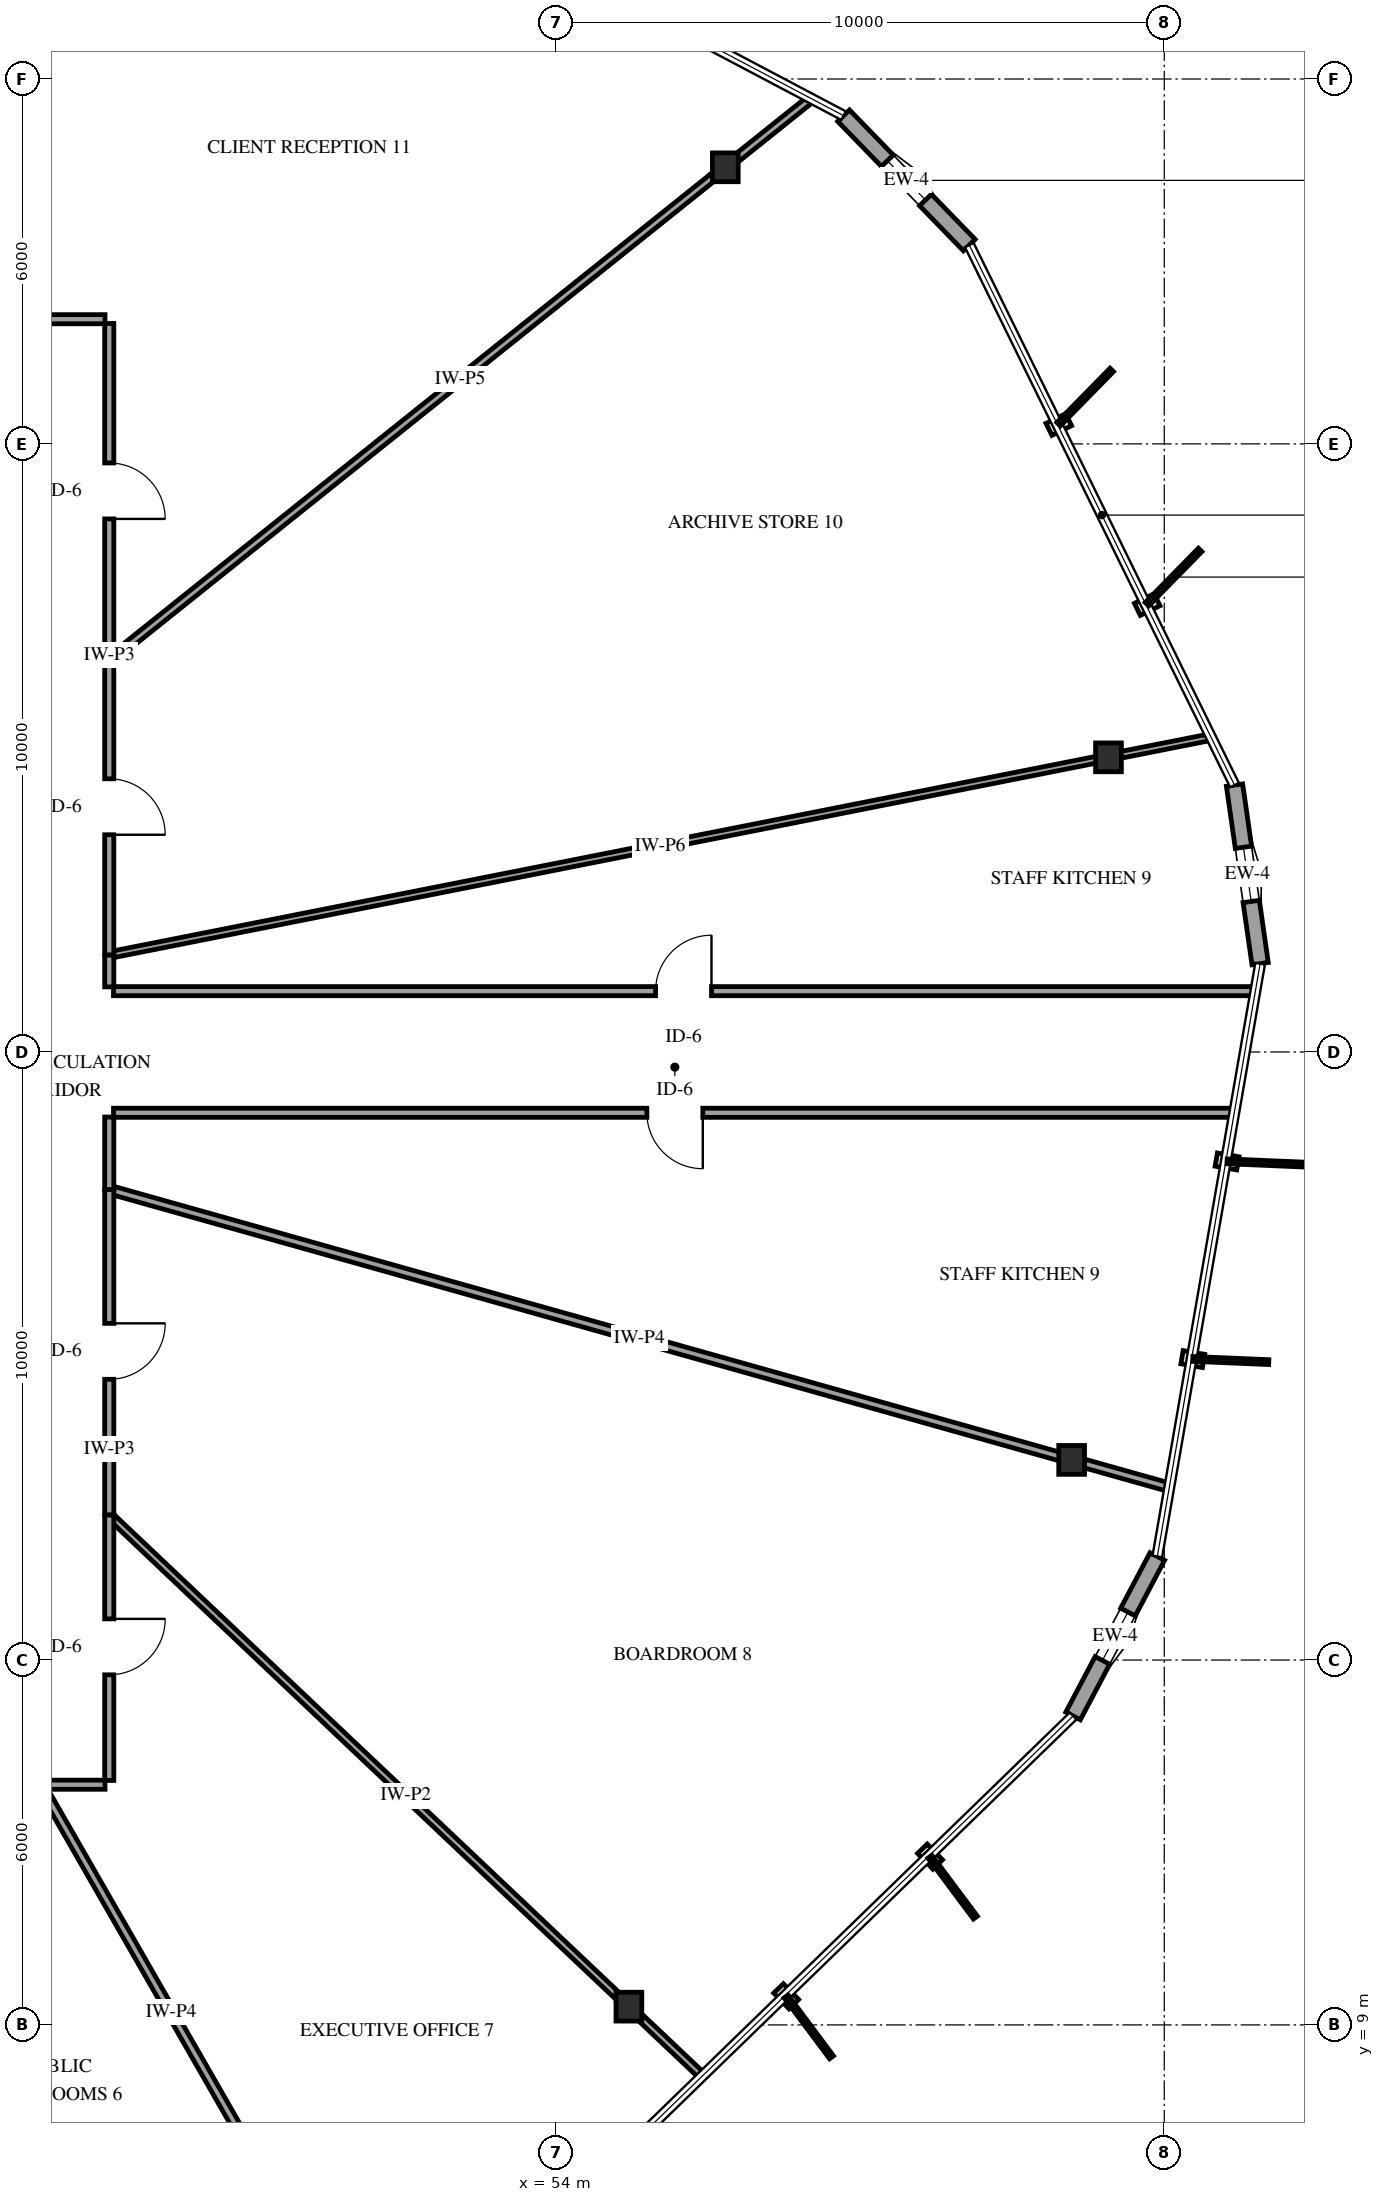
"""IFC4 building model, lengths in metres.
Left out: names, types, materials, properties, quantities, classifications, styles, units other than length and angle.
Written with IfcOpenShell. Run it as: python <this file> out.ifc"""

import sys

from ifc_helpers import new_model, si_unit, direction, frame, frame_2d, origin, origin_2d, place, context, subcontext, project, spatial, rectangle, i_section, extrude, element, fill, save


model = new_model("IFC4")
c1 = context("Model", 3, precision=1e-05, world=origin(), true_north=direction((0.0, 1.0)))
c2 = subcontext(c1, "Body", "Model", "MODEL_VIEW")
j1 = project(units=[si_unit("LENGTHUNIT", "METRE"), si_unit("PLANEANGLEUNIT", "RADIAN")], contexts=[c1])
p1 = place(None, origin())
s1 = spatial("IfcSite", under=j1, at=p1, CompositionType="ELEMENT")
p2 = place(p1, origin())
s2 = spatial("IfcBuilding", under=s1, at=p2, CompositionType="ELEMENT")
p3 = place(p2, frame((0.0, 0.0, 58.6)))
s3 = spatial("IfcBuildingStorey", under=s2, at=p3, CompositionType="ELEMENT", Elevation=58.6)
for number, where, z_axis, x_axis in (
    (1, (63.082, 29.845, 0.0), (0.0, 0.0, 1.0), (1.0, 0.0, 0.0)),
    (2, (56.781, 39.548, 0.0), (0.0, 0.0, 1.0), (1.0, 0.0, 0.0)),
    (3, (55.196, 9.3, 0.0), (0.0, 0.0, 1.0), (1.0, 0.0, 0.0)),
    (4, (62.477, 18.292, 0.0), (0.0, 0.0, 1.0), (1.0, 0.0, 0.0)),
):
    element("IfcColumn", number, at=place(p3, frame(where, z_axis=z_axis, x_axis=x_axis)), inside=s3, PredefinedType="COLUMN", context=c2, shape_type="SweptSolid", body=[
        extrude(i_section(OverallWidth=0.424, OverallDepth=0.474, WebThickness=0.048, FlangeThickness=0.077, FilletRadius=0.038, at=origin_2d()), origin(), (0.0, 0.0, 1.0), 4.0),
    ])
p4 = place(p3, frame((60.793, 38.269, 0.0), z_axis=(0.0, 0.0, 1.0), x_axis=(-0.69666106732, 0.717400416282, 0.0)))
e5 = element("IfcWall", 5, at=p4, inside=s3, PredefinedType="SOLIDWALL", context=c2, shape_type="SweptSolid", body=[
    extrude(rectangle(XDim=2.967, YDim=0.27, at=frame_2d((1.483, 0.0))), origin(), (0.0, 0.0, 1.0), 3.079),
])
p5 = place(p4, frame((1.033, 0.0, 0.75)))
e6 = element("IfcOpeningElement", 6, at=p5, cuts=e5, PredefinedType="OPENING", context=c2, shape_type="SweptSolid", body=[
    extrude(rectangle(XDim=0.9, YDim=1.5, at=frame_2d((0.45, 0.75))), frame((0.0, 0.145, 0.0), z_axis=(0.0, -1.0, 0.0), x_axis=(1.0, 0.0, 0.0)), (0.0, 0.0, 1.0), 0.29),
])
p6 = place(p3, frame((62.5, 14.08, 0.0), z_axis=(0.0, 0.0, 1.0), x_axis=(0.467017847618, 0.884247889455, 0.0)))
e7 = element("IfcWall", 7, at=p6, inside=s3, PredefinedType="SOLIDWALL", context=c2, shape_type="SweptSolid", body=[
    extrude(rectangle(XDim=2.967, YDim=0.27, at=frame_2d((1.483, 0.0))), origin(), (0.0, 0.0, 1.0), 3.079),
])
p7 = place(p6, frame((1.033, 0.0, 0.75)))
e8 = element("IfcOpeningElement", 8, at=p7, cuts=e7, PredefinedType="OPENING", context=c2, shape_type="SweptSolid", body=[
    extrude(rectangle(XDim=0.9, YDim=1.5, at=frame_2d((0.45, 0.75))), frame((0.0, 0.145, 0.0), z_axis=(0.0, -1.0, 0.0), x_axis=(1.0, 0.0, 0.0)), (0.0, 0.0, 1.0), 0.29),
])
p8 = place(p3, frame((65.576, 26.452, 0.0), z_axis=(0.0, 0.0, 1.0), x_axis=(-0.141962851347, 0.989871986086, 0.0)))
e9 = element("IfcWall", 9, at=p8, inside=s3, PredefinedType="SOLIDWALL", context=c2, shape_type="SweptSolid", body=[
    extrude(rectangle(XDim=2.967, YDim=0.27, at=frame_2d((1.483, 0.0))), origin(), (0.0, 0.0, 1.0), 3.079),
])
p9 = place(p8, frame((1.033, 0.0, 0.75)))
e10 = element("IfcOpeningElement", 10, at=p9, cuts=e9, PredefinedType="OPENING", context=c2, shape_type="SweptSolid", body=[
    extrude(rectangle(XDim=0.9, YDim=1.5, at=frame_2d((0.45, 0.75))), frame((0.0, 0.145, 0.0), z_axis=(0.0, -1.0, 0.0), x_axis=(1.0, 0.0, 0.0)), (0.0, 0.0, 1.0), 0.29),
])
p10 = place(p3, frame((46.72, 26.0, 0.0), z_axis=(0.0, 0.0, 1.0), x_axis=(1.0, 0.0, 0.0)))
e11 = element("IfcWall", 11, at=p10, inside=s3, PredefinedType="PARTITIONING", context=c2, shape_type="SweptSolid", body=[
    extrude(rectangle(XDim=18.778, YDim=0.15, at=frame_2d((9.389, 0.0))), origin(), (0.0, 0.0, 1.0), 3.7),
])
p11 = place(p10, frame((8.914, 0.0, 0.0)))
e12 = element("IfcOpeningElement", 12, at=p11, cuts=e11, PredefinedType="OPENING", context=c2, shape_type="SweptSolid", body=[
    extrude(rectangle(XDim=0.92, YDim=2.12, at=frame_2d((0.46, 1.06))), frame((0.0, 0.085, 0.0), z_axis=(0.0, -1.0, 0.0), x_axis=(1.0, 0.0, 0.0)), (0.0, 0.0, 1.0), 0.17),
])
p12 = place(p3, frame((46.65, 26.593, 0.0), z_axis=(0.0, 0.0, 1.0), x_axis=(0.980969206426, 0.194163374622, 0.0)))
e13 = element("IfcWall", 13, at=p12, inside=s3, PredefinedType="PARTITIONING", context=c2, shape_type="SweptSolid", body=[
    extrude(rectangle(XDim=18.469, YDim=0.11, at=frame_2d((9.234, 0.0))), origin(), (0.0, 0.0, 1.0), 2.995),
])
p13 = place(p3, frame((65.151, 24.0, 0.0), z_axis=(0.0, 0.0, 1.0), x_axis=(-1.0, 0.0, 0.0)))
e14 = element("IfcWall", 14, at=p13, inside=s3, PredefinedType="PARTITIONING", context=c2, shape_type="SweptSolid", body=[
    extrude(rectangle(XDim=18.431, YDim=0.15, at=frame_2d((9.215, 0.0))), origin(), (0.0, 0.0, 1.0), 3.7),
])
p14 = place(p13, frame((8.74, 0.0, 0.0)))
e15 = element("IfcOpeningElement", 15, at=p14, cuts=e14, PredefinedType="OPENING", context=c2, shape_type="SweptSolid", body=[
    extrude(rectangle(XDim=0.92, YDim=2.12, at=frame_2d((0.46, 1.06))), frame((0.0, 0.085, 0.0), z_axis=(0.0, -1.0, 0.0), x_axis=(1.0, 0.0, 0.0)), (0.0, 0.0, 1.0), 0.17),
])
p15 = place(p3, frame((46.65, 22.738, 0.0), z_axis=(0.0, 0.0, 1.0), x_axis=(0.962724478267, -0.270483971697, 0.0)))
e16 = element("IfcWall", 16, at=p15, inside=s3, PredefinedType="PARTITIONING", context=c2, shape_type="SweptSolid", body=[
    extrude(rectangle(XDim=18.108, YDim=0.14, at=frame_2d((9.054, 0.0))), origin(), (0.0, 0.0, 1.0), 2.995),
])
p16 = place(p3, frame((46.65, 31.442, 0.0), z_axis=(0.0, 0.0, 1.0), x_axis=(0.780812420754, 0.624765526895, 0.0)))
e17 = element("IfcWall", 17, at=p16, inside=s3, PredefinedType="PARTITIONING", context=c2, shape_type="SweptSolid", body=[
    extrude(rectangle(XDim=14.785, YDim=0.13, at=frame_2d((7.393, 0.0))), origin(), (0.0, 0.0, 1.0), 3.7),
])
p17 = place(p3, frame((46.65, 17.385, 0.0), z_axis=(0.0, 0.0, 1.0), x_axis=(0.726394067909, -0.687278442923, 0.0)))
e18 = element("IfcWall", 18, at=p17, inside=s3, PredefinedType="PARTITIONING", context=c2, shape_type="SweptSolid", body=[
    extrude(rectangle(XDim=13.426, YDim=0.12, at=frame_2d((6.713, 0.0))), origin(), (0.0, 0.0, 1.0), 2.995),
])
p18 = place(p3, frame((43.356, 37.05, 0.0), z_axis=(0.0, 0.0, 1.0), x_axis=(0.367253717082, 0.930120802525, 0.0)))
e19 = element("IfcWall", 19, at=p18, inside=s3, PredefinedType="PARTITIONING", context=c2, shape_type="SweptSolid", body=[
    extrude(rectangle(XDim=9.053, YDim=0.1, at=frame_2d((4.527, 0.0))), origin(), (0.0, 0.0, 1.0), 2.995),
])
p19 = place(p3, frame((45.517, 12.95, 0.0), z_axis=(0.0, 0.0, 1.0), x_axis=(0.497782071086, -0.867302144414, 0.0)))
e20 = element("IfcWall", 20, at=p19, inside=s3, PredefinedType="PARTITIONING", context=c2, shape_type="SweptSolid", body=[
    extrude(rectangle(XDim=8.636, YDim=0.14, at=frame_2d((4.318, 0.0))), origin(), (0.0, 0.0, 1.0), 3.074),
])
p20 = place(p3, frame((46.65, 36.98, 0.0), z_axis=(0.0, 0.0, 1.0), x_axis=(0.0, -1.0, 0.0)))
e21 = element("IfcWall", 21, at=p20, inside=s3, PredefinedType="PARTITIONING", context=c2, shape_type="SweptSolid", body=[
    extrude(rectangle(XDim=5.538, YDim=0.15, at=frame_2d((2.769, 0.0))), origin(), (0.0, 0.0, 1.0), 3.7),
])
p21 = place(p20, frame((2.294, 0.0, 0.0)))
e22 = element("IfcOpeningElement", 22, at=p21, cuts=e21, PredefinedType="OPENING", context=c2, shape_type="SweptSolid", body=[
    extrude(rectangle(XDim=0.92, YDim=2.12, at=frame_2d((0.46, 1.06))), frame((0.0, 0.085, 0.0), z_axis=(0.0, -1.0, 0.0), x_axis=(1.0, 0.0, 0.0)), (0.0, 0.0, 1.0), 0.17),
])
p22 = place(p3, frame((46.65, 22.738, 0.0), z_axis=(0.0, 0.0, 1.0), x_axis=(0.0, -1.0, 0.0)))
e23 = element("IfcWall", 23, at=p22, inside=s3, PredefinedType="PARTITIONING", context=c2, shape_type="SweptSolid", body=[
    extrude(rectangle(XDim=5.353, YDim=0.15, at=frame_2d((2.677, 0.0))), origin(), (0.0, 0.0, 1.0), 3.7),
])
p23 = place(p22, frame((2.201, 0.0, 0.0)))
e24 = element("IfcOpeningElement", 24, at=p23, cuts=e23, PredefinedType="OPENING", context=c2, shape_type="SweptSolid", body=[
    extrude(rectangle(XDim=0.92, YDim=2.12, at=frame_2d((0.46, 1.06))), frame((0.0, 0.085, 0.0), z_axis=(0.0, -1.0, 0.0), x_axis=(1.0, 0.0, 0.0)), (0.0, 0.0, 1.0), 0.17),
])
p24 = place(p3, frame((46.65, 31.442, 0.0), z_axis=(0.0, 0.0, 1.0), x_axis=(0.0, -1.0, 0.0)))
e25 = element("IfcWall", 25, at=p24, inside=s3, PredefinedType="PARTITIONING", context=c2, shape_type="SweptSolid", body=[
    extrude(rectangle(XDim=4.849, YDim=0.15, at=frame_2d((2.424, 0.0))), origin(), (0.0, 0.0, 1.0), 3.7),
])
p25 = place(p24, frame((1.95, 0.0, 0.0)))
e26 = element("IfcOpeningElement", 26, at=p25, cuts=e25, PredefinedType="OPENING", context=c2, shape_type="SweptSolid", body=[
    extrude(rectangle(XDim=0.92, YDim=2.12, at=frame_2d((0.46, 1.06))), frame((0.0, 0.085, 0.0), z_axis=(0.0, -1.0, 0.0), x_axis=(1.0, 0.0, 0.0)), (0.0, 0.0, 1.0), 0.17),
])
p26 = place(p3, frame((46.65, 17.385, 0.0), z_axis=(0.0, 0.0, 1.0), x_axis=(0.0, -1.0, 0.0)))
e27 = element("IfcWall", 27, at=p26, inside=s3, PredefinedType="PARTITIONING", context=c2, shape_type="SweptSolid", body=[
    extrude(rectangle(XDim=4.365, YDim=0.15, at=frame_2d((2.183, 0.0))), origin(), (0.0, 0.0, 1.0), 3.7),
])
p27 = place(p26, frame((1.708, 0.0, 0.0)))
e28 = element("IfcOpeningElement", 28, at=p27, cuts=e27, PredefinedType="OPENING", context=c2, shape_type="SweptSolid", body=[
    extrude(rectangle(XDim=0.92, YDim=2.12, at=frame_2d((0.46, 1.06))), frame((0.0, 0.085, 0.0), z_axis=(0.0, -1.0, 0.0), x_axis=(1.0, 0.0, 0.0)), (0.0, 0.0, 1.0), 0.17),
])
p28 = place(p3, frame((43.356, 37.05, 0.0), z_axis=(0.0, 0.0, 1.0), x_axis=(1.0, 0.0, 0.0)))
e29 = element("IfcWall", 29, at=p28, inside=s3, PredefinedType="PARTITIONING", context=c2, shape_type="SweptSolid", body=[
    extrude(rectangle(XDim=3.224, YDim=0.15, at=frame_2d((1.612, 0.0))), origin(), (0.0, 0.0, 1.0), 3.7),
])
p29 = place(p3, frame((46.65, 23.93, 0.0), z_axis=(0.0, 0.0, 1.0), x_axis=(0.0, -1.0, 0.0)))
e30 = element("IfcWall", 30, at=p29, inside=s3, PredefinedType="PARTITIONING", context=c2, shape_type="SweptSolid", body=[
    extrude(rectangle(XDim=1.192, YDim=0.15, at=frame_2d((0.596, 0.0))), origin(), (0.0, 0.0, 1.0), 3.7),
])
p30 = place(p3, frame((46.58, 12.95, 0.0), z_axis=(0.0, 0.0, 1.0), x_axis=(-1.0, 0.0, 0.0)))
e31 = element("IfcWall", 31, at=p30, inside=s3, PredefinedType="PARTITIONING", context=c2, shape_type="SweptSolid", body=[
    extrude(rectangle(XDim=1.063, YDim=0.15, at=frame_2d((0.531, 0.0))), origin(), (0.0, 0.0, 1.0), 3.7),
])
p31 = place(p3, frame((46.65, 26.593, 0.0), z_axis=(0.0, 0.0, 1.0), x_axis=(0.0, -1.0, 0.0)))
e32 = element("IfcWall", 32, at=p31, inside=s3, PredefinedType="PARTITIONING", context=c2, shape_type="SweptSolid", body=[
    extrude(rectangle(XDim=0.523, YDim=0.15, at=frame_2d((0.261, 0.0))), origin(), (0.0, 0.0, 1.0), 3.7),
])
p32 = place(p5, origin())
e33 = element("IfcWindow", 33, at=p32, inside=s3, PartitioningType="SINGLE_PANEL", PredefinedType="WINDOW", context=c2, shape_type="SweptSolid", body=[
    extrude(rectangle(XDim=0.9, YDim=1.5, at=frame_2d((0.45, 0.75))), frame((0.0, 0.03, 0.0), z_axis=(0.0, -1.0, 0.0), x_axis=(1.0, 0.0, 0.0)), (0.0, 0.0, 1.0), 0.06),
])
fill(e6, e33)
p33 = place(p7, origin())
e34 = element("IfcWindow", 34, at=p33, inside=s3, PartitioningType="SINGLE_PANEL", PredefinedType="WINDOW", context=c2, shape_type="SweptSolid", body=[
    extrude(rectangle(XDim=0.9, YDim=1.5, at=frame_2d((0.45, 0.75))), frame((0.0, 0.03, 0.0), z_axis=(0.0, -1.0, 0.0), x_axis=(1.0, 0.0, 0.0)), (0.0, 0.0, 1.0), 0.06),
])
fill(e8, e34)
p34 = place(p9, origin())
e35 = element("IfcWindow", 35, at=p34, inside=s3, PartitioningType="SINGLE_PANEL", PredefinedType="WINDOW", context=c2, shape_type="SweptSolid", body=[
    extrude(rectangle(XDim=0.9, YDim=1.5, at=frame_2d((0.45, 0.75))), frame((0.0, 0.03, 0.0), z_axis=(0.0, -1.0, 0.0), x_axis=(1.0, 0.0, 0.0)), (0.0, 0.0, 1.0), 0.06),
])
fill(e10, e35)
p35 = place(p11, origin())
e36 = element("IfcDoor", 36, at=p35, inside=s3, OperationType="SINGLE_SWING_RIGHT", PredefinedType="DOOR", context=c2, shape_type="SweptSolid", body=[
    extrude(rectangle(XDim=0.92, YDim=2.12, at=frame_2d((0.46, 1.06))), frame((0.0, 0.025, 0.0), z_axis=(0.0, -1.0, 0.0), x_axis=(1.0, 0.0, 0.0)), (0.0, 0.0, 1.0), 0.05),
])
fill(e12, e36)
p36 = place(p14, origin())
e37 = element("IfcDoor", 37, at=p36, inside=s3, OperationType="SINGLE_SWING_LEFT", PredefinedType="DOOR", context=c2, shape_type="SweptSolid", body=[
    extrude(rectangle(XDim=0.92, YDim=2.12, at=frame_2d((0.46, 1.06))), frame((0.0, 0.025, 0.0), z_axis=(0.0, -1.0, 0.0), x_axis=(1.0, 0.0, 0.0)), (0.0, 0.0, 1.0), 0.05),
])
fill(e15, e37)
p37 = place(p21, origin())
e38 = element("IfcDoor", 38, at=p37, inside=s3, OperationType="SINGLE_SWING_RIGHT", PredefinedType="DOOR", context=c2, shape_type="SweptSolid", body=[
    extrude(rectangle(XDim=0.92, YDim=2.12, at=frame_2d((0.46, 1.06))), frame((0.0, 0.025, 0.0), z_axis=(0.0, -1.0, 0.0), x_axis=(1.0, 0.0, 0.0)), (0.0, 0.0, 1.0), 0.05),
])
fill(e22, e38)
p38 = place(p23, origin())
e39 = element("IfcDoor", 39, at=p38, inside=s3, OperationType="SINGLE_SWING_LEFT", PredefinedType="DOOR", context=c2, shape_type="SweptSolid", body=[
    extrude(rectangle(XDim=0.92, YDim=2.12, at=frame_2d((0.46, 1.06))), frame((0.0, 0.025, 0.0), z_axis=(0.0, -1.0, 0.0), x_axis=(1.0, 0.0, 0.0)), (0.0, 0.0, 1.0), 0.05),
])
fill(e24, e39)
p39 = place(p25, origin())
e40 = element("IfcDoor", 40, at=p39, inside=s3, OperationType="SINGLE_SWING_RIGHT", PredefinedType="DOOR", context=c2, shape_type="SweptSolid", body=[
    extrude(rectangle(XDim=0.92, YDim=2.12, at=frame_2d((0.46, 1.06))), frame((0.0, 0.025, 0.0), z_axis=(0.0, -1.0, 0.0), x_axis=(1.0, 0.0, 0.0)), (0.0, 0.0, 1.0), 0.05),
])
fill(e26, e40)
p40 = place(p27, origin())
e41 = element("IfcDoor", 41, at=p40, inside=s3, OperationType="SINGLE_SWING_LEFT", PredefinedType="DOOR", context=c2, shape_type="SweptSolid", body=[
    extrude(rectangle(XDim=0.92, YDim=2.12, at=frame_2d((0.46, 1.06))), frame((0.0, 0.025, 0.0), z_axis=(0.0, -1.0, 0.0), x_axis=(1.0, 0.0, 0.0)), (0.0, 0.0, 1.0), 0.05),
])
fill(e28, e41)
save(model, sys.argv[1])
